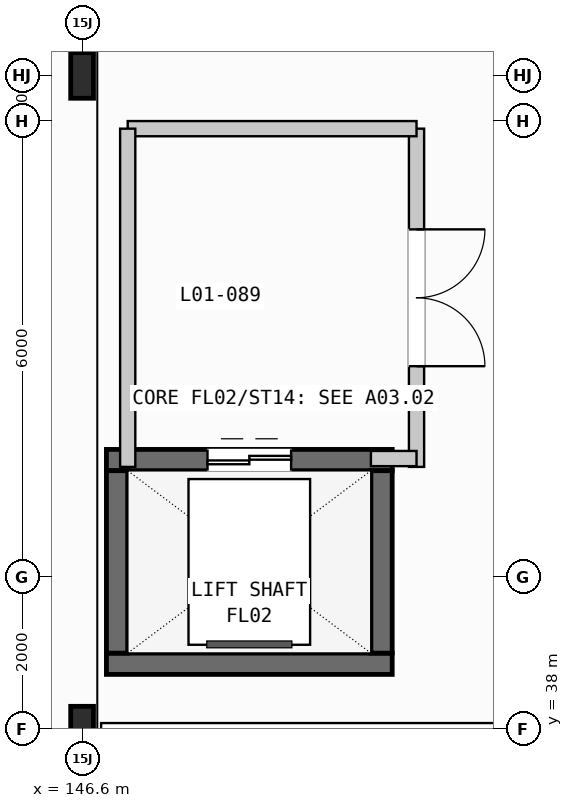
"""IFC4 building model, lengths in metres.
Left out: names, types, materials, properties, quantities, classifications, styles, units other than length and angle.
Written with IfcOpenShell. Run it as: python <this file> out.ifc"""

import sys

from ifc_helpers import new_model, si_unit, direction, frame, frame_2d, origin, origin_2d, place, context, subcontext, project, spatial, rectangle, i_section, extrude, element, fill, save


model = new_model("IFC4")
c1 = context("Model", 3, precision=1e-05, world=origin(), true_north=direction((0.0, 1.0)))
c2 = subcontext(c1, "Body", "Model", "MODEL_VIEW")
j1 = project(units=[si_unit("LENGTHUNIT", "METRE"), si_unit("PLANEANGLEUNIT", "RADIAN")], contexts=[c1])
p1 = place(None, origin())
s1 = spatial("IfcSite", under=j1, at=p1, CompositionType="ELEMENT")
p2 = place(p1, origin())
s2 = spatial("IfcBuilding", under=s1, at=p2, CompositionType="ELEMENT")
p3 = place(p2, frame((0.0, 0.0, 6.0)))
s3 = spatial("IfcBuildingStorey", under=s2, at=p3, CompositionType="ELEMENT", Elevation=6.0)
for number, where, z_axis, x_axis in (
    (1, (146.6, 38.0, 0.0), (0.0, 0.0, 1.0), (1.0, 0.0, 0.0)),
    (2, (146.6, 46.6, 0.0), (0.0, 0.0, 1.0), (1.0, 0.0, 0.0)),
):
    element("IfcColumn", number, at=place(p3, frame(where, z_axis=z_axis, x_axis=x_axis)), inside=s3, PredefinedType="COLUMN", context=c2, shape_type="SweptSolid", body=[
        extrude(i_section(OverallWidth=0.3, OverallDepth=0.6, WebThickness=0.015, FlangeThickness=0.03, FilletRadius=0.027, at=origin_2d()), origin(), (0.0, 0.0, 1.0), 5.4),
    ])
p4 = place(p3, frame((146.92, 38.86, 0.0), z_axis=(0.0, 0.0, 1.0), x_axis=(1.0, 0.0, 0.0)))
e3 = element("IfcWall", 3, at=p4, inside=s3, PredefinedType="SHEAR", context=c2, shape_type="SweptSolid", body=[
    extrude(rectangle(XDim=3.76, YDim=0.28, at=frame_2d((1.88, 0.0))), origin(), (0.0, 0.0, 1.0), 5.4),
])
p5 = place(p3, frame((146.92, 41.54, 0.0), z_axis=(0.0, 0.0, 1.0), x_axis=(1.0, 0.0, 0.0)))
e4 = element("IfcWall", 4, at=p5, inside=s3, PredefinedType="SHEAR", context=c2, shape_type="SweptSolid", body=[
    extrude(rectangle(XDim=3.76, YDim=0.28, at=frame_2d((1.88, 0.0))), origin(), (0.0, 0.0, 1.0), 5.4),
])
p6 = place(p5, frame((1.33, 0.0, 0.0)))
e5 = element("IfcOpeningElement", 5, at=p6, cuts=e4, PredefinedType="OPENING", context=c2, shape_type="SweptSolid", body=[
    extrude(rectangle(XDim=1.1, YDim=2.15, at=frame_2d((0.55, 1.075))), frame((0.0, 0.15, 0.0), z_axis=(0.0, -1.0, 0.0), x_axis=(1.0, 0.0, 0.0)), (0.0, 0.0, 1.0), 0.3),
])
for number, where, z_axis, x_axis in (
    (6, (147.06, 39.0, 0.0), (0.0, 0.0, 1.0), (0.0, 1.0, 0.0)),
    (7, (150.54, 39.0, 0.0), (0.0, 0.0, 1.0), (0.0, 1.0, 0.0)),
):
    element("IfcWall", number, at=place(p3, frame(where, z_axis=z_axis, x_axis=x_axis)), inside=s3, PredefinedType="SHEAR", context=c2, shape_type="SweptSolid", body=[
        extrude(rectangle(XDim=2.4, YDim=0.28, at=frame_2d((1.2, 0.0))), origin(), (0.0, 0.0, 1.0), 5.4),
    ])
p7 = place(p3, frame((151.0, 41.45, 0.0), z_axis=(0.0, 0.0, 1.0), x_axis=(0.0, 1.0, 0.0)))
e8 = element("IfcWall", 8, at=p7, inside=s3, PredefinedType="PARTITIONING", context=c2, shape_type="SweptSolid", body=[
    extrude(rectangle(XDim=4.45, YDim=0.2, at=frame_2d((2.225, 0.0))), origin(), (0.0, 0.0, 1.0), 4.0),
])
p8 = place(p7, frame((1.325, 0.0, 0.0)))
e9 = element("IfcOpeningElement", 9, at=p8, cuts=e8, PredefinedType="OPENING", context=c2, shape_type="SweptSolid", body=[
    extrude(rectangle(XDim=1.8, YDim=2.2, at=frame_2d((0.9, 1.1))), frame((0.0, 0.11, 0.0), z_axis=(0.0, -1.0, 0.0), x_axis=(1.0, 0.0, 0.0)), (0.0, 0.0, 1.0), 0.22),
])
p9 = place(p3, frame((147.2, 45.9, 0.0), z_axis=(0.0, 0.0, 1.0), x_axis=(1.0, 0.0, 0.0)))
e10 = element("IfcWall", 10, at=p9, inside=s3, PredefinedType="PARTITIONING", context=c2, shape_type="SweptSolid", body=[
    extrude(rectangle(XDim=3.8, YDim=0.2, at=frame_2d((1.9, 0.0))), origin(), (0.0, 0.0, 1.0), 4.0),
])
p10 = place(p3, frame((147.2, 41.45, 0.0), z_axis=(0.0, 0.0, 1.0), x_axis=(0.0, 1.0, 0.0)))
e11 = element("IfcWall", 11, at=p10, inside=s3, PredefinedType="PARTITIONING", context=c2, shape_type="SweptSolid", body=[
    extrude(rectangle(XDim=4.45, YDim=0.2, at=frame_2d((2.225, 0.0))), origin(), (0.0, 0.0, 1.0), 4.0),
])
p11 = place(p3, frame((150.4, 41.56, 0.0), z_axis=(0.0, 0.0, 1.0), x_axis=(1.0, 0.0, 0.0)))
e12 = element("IfcWall", 12, at=p11, inside=s3, PredefinedType="PARTITIONING", context=c2, shape_type="SweptSolid", body=[
    extrude(rectangle(XDim=0.6, YDim=0.2, at=frame_2d((0.3, 0.0))), origin(), (0.0, 0.0, 1.0), 4.0),
])
p12 = place(p6, origin())
e13 = element("IfcDoor", 13, at=p12, inside=s3, OperationType="DOUBLE_DOOR_SLIDING", PredefinedType="DOOR", context=c2, shape_type="SweptSolid", body=[
    extrude(rectangle(XDim=1.1, YDim=2.15, at=frame_2d((0.55, 1.075))), frame((0.0, 0.025, 0.0), z_axis=(0.0, -1.0, 0.0), x_axis=(1.0, 0.0, 0.0)), (0.0, 0.0, 1.0), 0.05),
])
fill(e5, e13)
p13 = place(p8, frame((1.8, 0.0, 0.0), z_axis=(0.0, 0.0, 1.0), x_axis=(-1.0, 0.0, 0.0)))
e14 = element("IfcDoor", 14, at=p13, inside=s3, OperationType="DOUBLE_DOOR_SINGLE_SWING", PredefinedType="DOOR", context=c2, shape_type="SweptSolid", body=[
    extrude(rectangle(XDim=1.8, YDim=2.2, at=frame_2d((0.9, 1.1))), frame((0.0, 0.025, 0.0), z_axis=(0.0, -1.0, 0.0), x_axis=(1.0, 0.0, 0.0)), (0.0, 0.0, 1.0), 0.05),
])
fill(e9, e14)
save(model, sys.argv[1])
